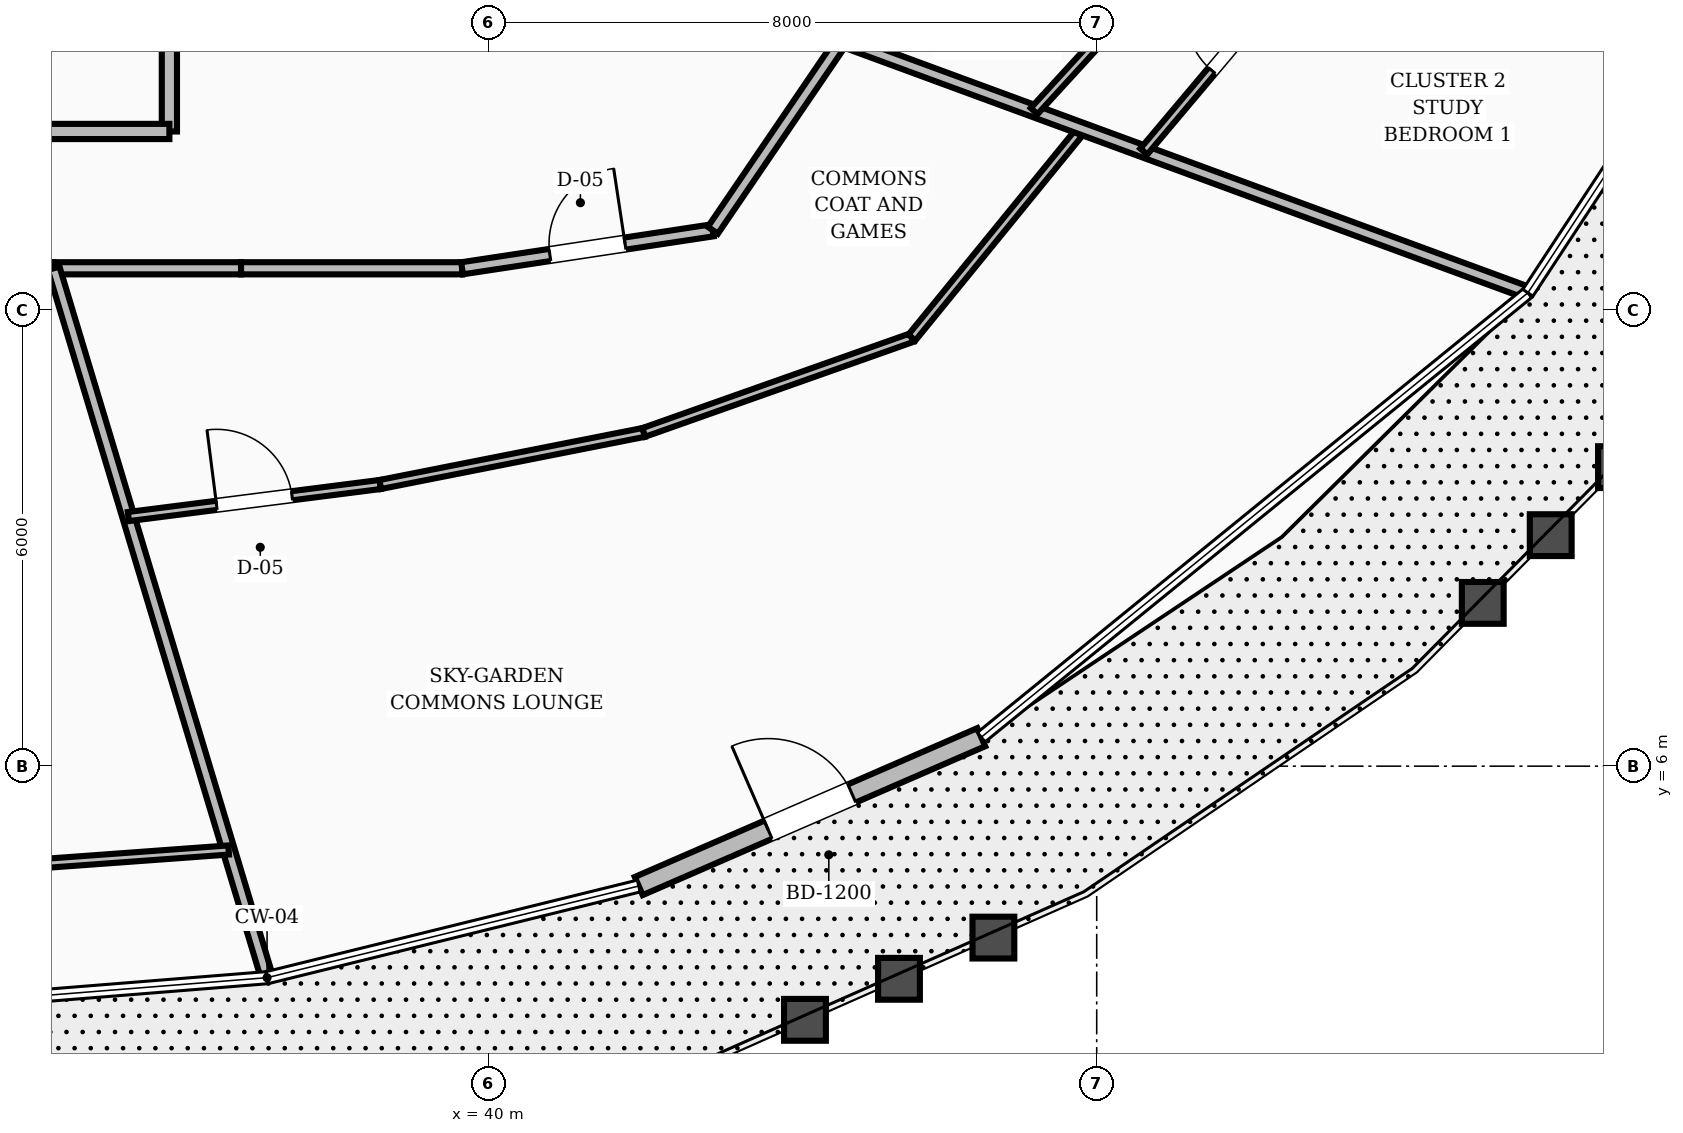
"""IFC4 building model, lengths in metres.
Left out: names, types, materials, properties, quantities, classifications, styles, units other than length and angle.
Written with IfcOpenShell. Run it as: python <this file> out.ifc"""

import sys

from ifc_helpers import new_model, si_unit, direction, frame, frame_2d, origin, place, context, subcontext, project, spatial, rectangle, extrude, element, fill, save


model = new_model("IFC4")
c1 = context("Model", 3, precision=1e-05, world=origin(), true_north=direction((0.0, 1.0)))
c2 = subcontext(c1, "Body", "Model", "MODEL_VIEW")
j1 = project(units=[si_unit("LENGTHUNIT", "METRE"), si_unit("PLANEANGLEUNIT", "RADIAN")], contexts=[c1])
p1 = place(None, origin())
s1 = spatial("IfcSite", under=j1, at=p1, CompositionType="ELEMENT")
p2 = place(p1, origin())
s2 = spatial("IfcBuilding", under=s1, at=p2, CompositionType="ELEMENT")
p3 = place(p2, frame((0.0, 0.0, 128.0)))
s3 = spatial("IfcBuildingStorey", under=s2, at=p3, CompositionType="ELEMENT", Elevation=128.0)
p4 = place(p3, frame((41.975, 4.423, 0.0), z_axis=(0.0, 0.0, 1.0), x_axis=(0.917164827063, 0.39850806767, 0.0)))
e1 = element("IfcWall", 1, at=p4, inside=s3, PredefinedType="STANDARD", context=c2, shape_type="SweptSolid", body=[
    extrude(rectangle(XDim=4.913, YDim=0.26, at=frame_2d((2.457, 0.0))), origin(), (0.0, 0.0, 1.0), 2.82),
])
p5 = place(p4, frame((1.857, 0.0, 0.0)))
e2 = element("IfcOpeningElement", 2, at=p5, cuts=e1, PredefinedType="OPENING", context=c2, shape_type="SweptSolid", body=[
    extrude(rectangle(XDim=1.2, YDim=2.15, at=frame_2d((0.6, 1.075))), frame((0.0, 0.14, 0.0), z_axis=(0.0, -1.0, 0.0), x_axis=(1.0, 0.0, 0.0)), (0.0, 0.0, 1.0), 0.28),
])
p6 = place(p3, frame((35.8, 14.35, 0.0), z_axis=(0.0, 0.0, 1.0), x_axis=(0.0, 1.0, 0.0)))
e3 = element("IfcWall", 3, at=p6, inside=s3, PredefinedType="SOLIDWALL", context=c2, shape_type="SweptSolid", body=[
    extrude(rectangle(XDim=2.2, YDim=0.2, at=frame_2d((1.1, 0.0))), origin(), (0.0, 0.0, 1.0), 2.8),
])
p7 = place(p3, frame((28.2, 14.35, 0.0), z_axis=(0.0, 0.0, 1.0), x_axis=(1.0, 0.0, 0.0)))
e4 = element("IfcWall", 4, at=p7, inside=s3, PredefinedType="SOLIDWALL", context=c2, shape_type="SweptSolid", body=[
    extrude(rectangle(XDim=7.6, YDim=0.2, at=frame_2d((3.8, 0.0))), origin(), (0.0, 0.0, 1.0), 2.8),
])
p8 = place(p7, frame((3.2, 0.0, 0.0)))
e5 = element("IfcOpeningElement", 5, at=p8, cuts=e4, PredefinedType="OPENING", context=c2, shape_type="SweptSolid", body=[
    extrude(rectangle(XDim=1.2, YDim=2.1, at=frame_2d((0.6, 1.05))), frame((0.0, 0.11, 0.0), z_axis=(0.0, -1.0, 0.0), x_axis=(1.0, 0.0, 0.0)), (0.0, 0.0, 1.0), 0.22),
])
p9 = place(p3, frame((32.0, 12.55, 0.0), z_axis=(0.0, 0.0, 1.0), x_axis=(1.0, 0.0, 0.0)))
e6 = element("IfcWall", 6, at=p9, inside=s3, PredefinedType="SOLIDWALL", context=c2, shape_type="SweptSolid", body=[
    extrude(rectangle(XDim=2.278, YDim=0.16, at=frame_2d((1.139, 0.0))), origin(), (0.0, 0.0, 1.0), 2.8),
])
p10 = place(p3, frame((34.278, 12.55, 0.0), z_axis=(0.0, 0.0, 1.0), x_axis=(1.0, 0.0, 0.0)))
e7 = element("IfcWall", 7, at=p10, inside=s3, PredefinedType="SOLIDWALL", context=c2, shape_type="SweptSolid", body=[
    extrude(rectangle(XDim=2.465, YDim=0.16, at=frame_2d((1.232, 0.0))), origin(), (0.0, 0.0, 1.0), 2.8),
])
p11 = place(p3, frame((36.743, 12.55, 0.0), z_axis=(0.0, 0.0, 1.0), x_axis=(1.0, 0.0, 0.0)))
e8 = element("IfcWall", 8, at=p11, inside=s3, PredefinedType="SOLIDWALL", context=c2, shape_type="SweptSolid", body=[
    extrude(rectangle(XDim=2.908, YDim=0.16, at=frame_2d((1.454, 0.0))), origin(), (0.0, 0.0, 1.0), 2.8),
])
p12 = place(p3, frame((39.651, 12.55, 0.0), z_axis=(0.0, 0.0, 1.0), x_axis=(0.988710906508, 0.149835721217, 0.0)))
e9 = element("IfcWall", 9, at=p12, inside=s3, PredefinedType="SOLIDWALL", context=c2, shape_type="SweptSolid", body=[
    extrude(rectangle(XDim=3.337, YDim=0.16, at=frame_2d((1.668, 0.0))), origin(), (0.0, 0.0, 1.0), 2.8),
])
p13 = place(p12, frame((1.168, 0.0, 0.0)))
e10 = element("IfcOpeningElement", 10, at=p13, cuts=e9, PredefinedType="OPENING", context=c2, shape_type="SweptSolid", body=[
    extrude(rectangle(XDim=1.0, YDim=2.1, at=frame_2d((0.5, 1.05))), frame((0.0, 0.09, 0.0), z_axis=(0.0, -1.0, 0.0), x_axis=(1.0, 0.0, 0.0)), (0.0, 0.0, 1.0), 0.18),
])
p14 = place(p3, frame((42.95, 13.05, 0.0), z_axis=(0.0, 0.0, 1.0), x_axis=(0.562674669208, 0.826678423955, 0.0)))
e11 = element("IfcWall", 11, at=p14, inside=s3, PredefinedType="SOLIDWALL", context=c2, shape_type="SweptSolid", body=[
    extrude(rectangle(XDim=3.021, YDim=0.16, at=frame_2d((1.511, 0.0))), origin(), (0.0, 0.0, 1.0), 2.8),
])
p15 = place(p3, frame((34.278, 12.55, 0.0), z_axis=(0.0, 0.0, 1.0), x_axis=(0.288080089765, -0.957606318839, 0.0)))
e12 = element("IfcWall", 12, at=p15, inside=s3, PredefinedType="SOLIDWALL", context=c2, shape_type="SweptSolid", body=[
    extrude(rectangle(XDim=9.696, YDim=0.16, at=frame_2d((4.848, 0.0))), origin(), (0.0, 0.0, 1.0), 2.8),
])
p16 = place(p3, frame((35.26, 9.284, 0.0), z_axis=(0.0, 0.0, 1.0), x_axis=(0.99199308458, 0.126292201441, 0.0)))
e13 = element("IfcWall", 13, at=p16, inside=s3, PredefinedType="PARTITIONING", context=c2, shape_type="SweptSolid", body=[
    extrude(rectangle(XDim=3.341, YDim=0.12, at=frame_2d((1.67, 0.0))), origin(), (0.0, 0.0, 1.0), 2.8),
])
p17 = place(p16, frame((1.17, 0.0, 0.0)))
e14 = element("IfcOpeningElement", 14, at=p17, cuts=e13, PredefinedType="OPENING", context=c2, shape_type="SweptSolid", body=[
    extrude(rectangle(XDim=1.0, YDim=2.1, at=frame_2d((0.5, 1.05))), frame((0.0, 0.07, 0.0), z_axis=(0.0, -1.0, 0.0), x_axis=(1.0, 0.0, 0.0)), (0.0, 0.0, 1.0), 0.14),
])
p18 = place(p3, frame((38.574, 9.706, 0.0), z_axis=(0.0, 0.0, 1.0), x_axis=(0.981021848775, 0.19389722078, 0.0)))
e15 = element("IfcWall", 15, at=p18, inside=s3, PredefinedType="PARTITIONING", context=c2, shape_type="SweptSolid", body=[
    extrude(rectangle(XDim=3.534, YDim=0.12, at=frame_2d((1.767, 0.0))), origin(), (0.0, 0.0, 1.0), 2.8),
])
p19 = place(p3, frame((42.041, 10.391, 0.0), z_axis=(0.0, 0.0, 1.0), x_axis=(0.942784138044, 0.333403762806, 0.0)))
e16 = element("IfcWall", 16, at=p19, inside=s3, PredefinedType="PARTITIONING", context=c2, shape_type="SweptSolid", body=[
    extrude(rectangle(XDim=3.741, YDim=0.12, at=frame_2d((1.871, 0.0))), origin(), (0.0, 0.0, 1.0), 2.8),
])
p20 = place(p3, frame((45.568, 11.638, 0.0), z_axis=(0.0, 0.0, 1.0), x_axis=(0.631833921948, 0.775103796324, 0.0)))
e17 = element("IfcWall", 17, at=p20, inside=s3, PredefinedType="PARTITIONING", context=c2, shape_type="SweptSolid", body=[
    extrude(rectangle(XDim=3.544, YDim=0.12, at=frame_2d((1.772, 0.0))), origin(), (0.0, 0.0, 1.0), 2.8),
])
p21 = place(p3, frame((44.65, 15.548, 0.0), z_axis=(0.0, 0.0, 1.0), x_axis=(0.938483808639, -0.345323241215, 0.0)))
e18 = element("IfcWall", 18, at=p21, inside=s3, PredefinedType="SOLIDWALL", context=c2, shape_type="SweptSolid", body=[
    extrude(rectangle(XDim=9.564, YDim=0.16, at=frame_2d((4.782, 0.0))), origin(), (0.0, 0.0, 1.0), 2.8),
])
p22 = place(p3, frame((47.177, 14.618, 0.0), z_axis=(0.0, 0.0, 1.0), x_axis=(0.675367129761, 0.737481687935, 0.0)))
e19 = element("IfcWall", 19, at=p22, inside=s3, PredefinedType="PARTITIONING", context=c2, shape_type="SweptSolid", body=[
    extrude(rectangle(XDim=3.557, YDim=0.12, at=frame_2d((1.779, 0.0))), origin(), (0.0, 0.0, 1.0), 2.8),
])
p23 = place(p3, frame((48.62, 14.087, 0.0), z_axis=(0.0, 0.0, 1.0), x_axis=(0.644101495502, 0.764940039148, 0.0)))
e20 = element("IfcWall", 20, at=p23, inside=s3, PredefinedType="PARTITIONING", context=c2, shape_type="SweptSolid", body=[
    extrude(rectangle(XDim=3.732, YDim=0.12, at=frame_2d((1.866, 0.0))), origin(), (0.0, 0.0, 1.0), 2.8),
])
p24 = place(p23, frame((1.391, 0.0, 0.0)))
e21 = element("IfcOpeningElement", 21, at=p24, cuts=e20, PredefinedType="OPENING", context=c2, shape_type="SweptSolid", body=[
    extrude(rectangle(XDim=0.95, YDim=2.1, at=frame_2d((0.475, 1.05))), frame((0.0, 0.07, 0.0), z_axis=(0.0, -1.0, 0.0), x_axis=(1.0, 0.0, 0.0)), (0.0, 0.0, 1.0), 0.14),
])
p25 = place(p3, frame((32.0, 4.563, 0.0), z_axis=(0.0, 0.0, 1.0), x_axis=(0.997351250067, 0.072735713301, 0.0)))
e22 = element("IfcWall", 22, at=p25, inside=s3, PredefinedType="PARTITIONING", context=c2, shape_type="SweptSolid", body=[
    extrude(rectangle(XDim=4.592, YDim=0.12, at=frame_2d((2.296, 0.0))), origin(), (0.0, 0.0, 1.0), 2.8),
])
p26 = place(p5, origin())
e23 = element("IfcDoor", 23, at=p26, inside=s3, OperationType="SINGLE_SWING_LEFT", PredefinedType="DOOR", context=c2, shape_type="SweptSolid", body=[
    extrude(rectangle(XDim=1.2, YDim=2.15, at=frame_2d((0.6, 1.075))), frame((0.0, 0.025, 0.0), z_axis=(0.0, -1.0, 0.0), x_axis=(1.0, 0.0, 0.0)), (0.0, 0.0, 1.0), 0.05),
])
fill(e2, e23)
p27 = place(p13, origin())
e24 = element("IfcDoor", 24, at=p27, inside=s3, OperationType="SINGLE_SWING_RIGHT", PredefinedType="DOOR", context=c2, shape_type="SweptSolid", body=[
    extrude(rectangle(XDim=1.0, YDim=2.1, at=frame_2d((0.5, 1.05))), frame((0.0, 0.025, 0.0), z_axis=(0.0, -1.0, 0.0), x_axis=(1.0, 0.0, 0.0)), (0.0, 0.0, 1.0), 0.05),
])
fill(e10, e24)
p28 = place(p17, origin())
e25 = element("IfcDoor", 25, at=p28, inside=s3, OperationType="SINGLE_SWING_LEFT", PredefinedType="DOOR", context=c2, shape_type="SweptSolid", body=[
    extrude(rectangle(XDim=1.0, YDim=2.1, at=frame_2d((0.5, 1.05))), frame((0.0, 0.025, 0.0), z_axis=(0.0, -1.0, 0.0), x_axis=(1.0, 0.0, 0.0)), (0.0, 0.0, 1.0), 0.05),
])
fill(e14, e25)
p29 = place(p24, origin())
e26 = element("IfcDoor", 26, at=p29, inside=s3, OperationType="SINGLE_SWING_RIGHT", PredefinedType="DOOR", context=c2, shape_type="SweptSolid", body=[
    extrude(rectangle(XDim=0.95, YDim=2.1, at=frame_2d((0.475, 1.05))), frame((0.0, 0.025, 0.0), z_axis=(0.0, -1.0, 0.0), x_axis=(1.0, 0.0, 0.0)), (0.0, 0.0, 1.0), 0.05),
])
fill(e21, e26)
save(model, sys.argv[1])
